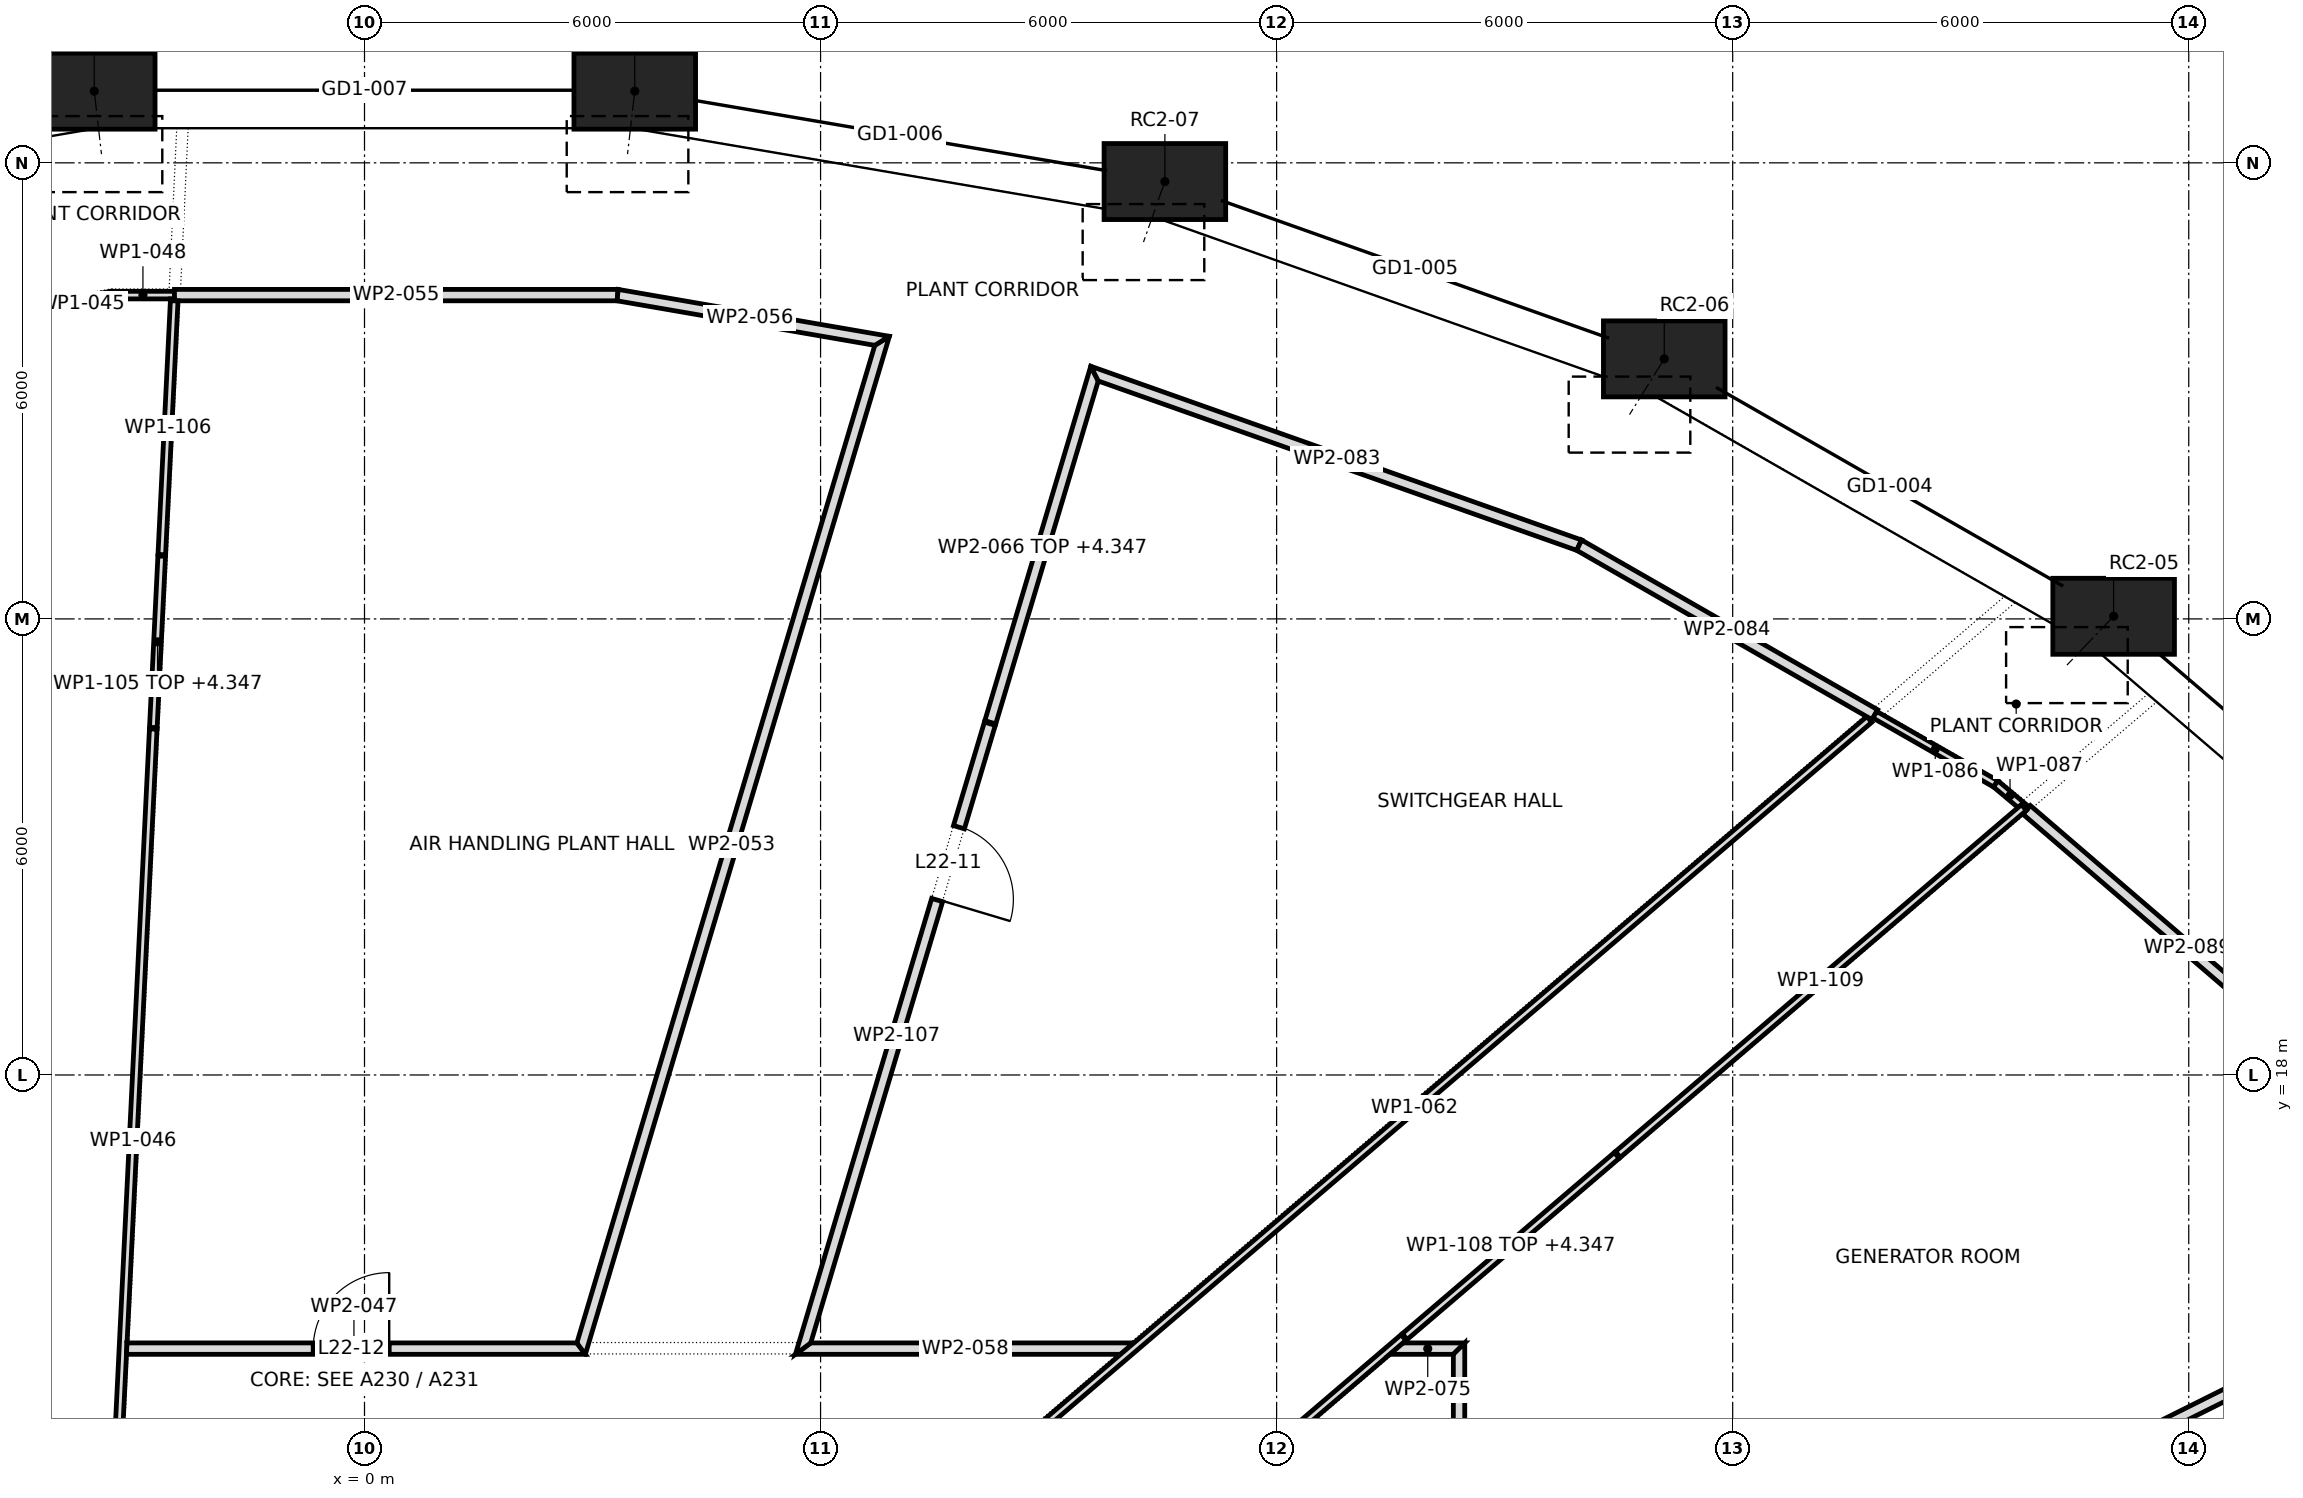
"""IFC4 building model, lengths in metres.
Left out: names, types, materials, properties, quantities, classifications, styles, units other than length and angle.
Written with IfcOpenShell. Run it as: python <this file> out.ifc"""

import sys

from ifc_helpers import new_model, si_unit, direction, frame, frame_2d, origin, origin_2d, place, context, subcontext, project, spatial, polyline, rectangle, outline, extrude, element, fill, save


model = new_model("IFC4")
c1 = context("Model", 3, precision=1e-05, world=origin(), true_north=direction((0.0, 1.0)))
c2 = subcontext(c1, "Body", "Model", "MODEL_VIEW")
j1 = project(units=[si_unit("LENGTHUNIT", "METRE"), si_unit("PLANEANGLEUNIT", "RADIAN")], contexts=[c1])
p1 = place(None, origin())
s1 = spatial("IfcSite", under=j1, at=p1, CompositionType="ELEMENT")
p2 = place(p1, origin())
s2 = spatial("IfcBuilding", under=s1, at=p2, CompositionType="ELEMENT")
p3 = place(p2, frame((0.0, 0.0, 99.1)))
s3 = spatial("IfcBuildingStorey", under=s2, at=p3, CompositionType="ELEMENT", Elevation=99.1)
p4 = place(p3, frame((23.012, 24.034, 0.083), z_axis=(-0.115812481815, -0.12096379157, 0.985877898213), x_axis=(0.722319686129, -0.691559304059, 0.0)))
e1 = element("IfcColumn", 1, at=p4, inside=s3, PredefinedType="COLUMN", context=c2, shape_type="SweptSolid", body=[
    extrude(rectangle(XDim=1.6, YDim=1.0, at=origin_2d()), origin(), (0.0, 0.0, 1.0), 5.308),
])
p5 = place(p3, frame((17.1, 27.421, 0.081), z_axis=(-0.08609317292, -0.138107798226, 0.986668232815), x_axis=(0.848616882571, -0.529007926798, 0.0)))
e2 = element("IfcColumn", 2, at=p5, inside=s3, PredefinedType="COLUMN", context=c2, shape_type="SweptSolid", body=[
    extrude(rectangle(XDim=1.6, YDim=1.0, at=origin_2d()), origin(), (0.0, 0.0, 1.0), 5.309),
])
p6 = place(p3, frame((10.53, 29.754, 0.079), z_axis=(-0.053064720362, -0.149997502446, 0.987261305184), x_axis=(0.942744642547, -0.333515425352, 0.0)))
e3 = element("IfcColumn", 3, at=p6, inside=s3, PredefinedType="COLUMN", context=c2, shape_type="SweptSolid", body=[
    extrude(rectangle(XDim=1.6, YDim=1.0, at=origin_2d()), origin(), (0.0, 0.0, 1.0), 5.309),
])
for number, where, z_axis, x_axis in (
    (4, (3.556, 30.943, 0.078), (-0.018, -0.156, 0.988), (0.993, -0.114, 0.0)),
    (5, (-3.556, 30.943, 0.078), (0.018, -0.156, 0.988), (0.993, 0.114, 0.0)),
):
    element("IfcColumn", number, at=place(p3, frame(where, z_axis=z_axis, x_axis=x_axis)), inside=s3, PredefinedType="COLUMN", context=c2, shape_type="SweptSolid", body=[
        extrude(rectangle(XDim=1.6, YDim=1.0, at=origin_2d()), origin(), (0.0, 0.0, 1.0), 5.31),
    ])
p7 = place(p3, frame((-3.326, 28.261, 0.0), z_axis=(0.0, 0.0, 1.0), x_axis=(-0.985421236807, -0.170132260461, 0.0)))
e6 = element("IfcWall", 6, at=p7, inside=s3, PredefinedType="PARTITIONING", context=c2, shape_type="SweptSolid", body=[
    extrude(outline(polyline([(1.415, 0.05), (0.009, 0.05), (0.0, -0.05), (1.415, -0.05), (1.415, 0.05)])), origin(), (0.0, 0.0, 1.0), 5.1),
])
p8 = place(p3, frame((-3.31, 11.7, 0.0), z_axis=(0.0, 0.0, 1.0), x_axis=(0.048854758108, 0.99880589336, 0.0)))
e7 = element("IfcWall", 7, at=p8, inside=s3, PredefinedType="PARTITIONING", context=c2, shape_type="SweptSolid", body=[
    extrude(outline(polyline([(0.0, -0.05), (1.382, -0.05), (2.765, -0.05), (2.781, -0.049), (2.781, -0.05), (4.399, -0.05), (6.018, -0.05), (7.637, -0.05), (9.255, -0.05), (10.874, -0.05), (10.874, 0.05), (9.062, 0.05), (7.249, 0.05), (5.437, 0.05), (3.625, 0.05), (1.812, 0.05), (0.0, 0.05), (0.0, -0.05)])), origin(), (0.0, 0.0, 1.0), 5.1),
])
p9 = place(p3, frame((-3.132, 14.4, 0.0), z_axis=(0.0, 0.0, 1.0), x_axis=(1.0, 0.0, 0.0)))
e8 = element("IfcWall", 8, at=p9, inside=s3, PredefinedType="PARTITIONING", context=c2, shape_type="SweptSolid", body=[
    extrude(outline(polyline([(0.0, -0.075), (1.509, -0.075), (3.019, -0.075), (4.528, -0.075), (6.038, -0.075), (5.982, 0.0), (5.926, 0.075), (3.953, 0.075), (1.98, 0.075), (0.007, 0.075), (0.0, -0.075)])), origin(), (0.0, 0.0, 1.0), 5.1),
])
p10 = place(p9, frame((2.457, 0.0, 0.0)))
e9 = element("IfcOpeningElement", 9, at=p10, cuts=e8, PredefinedType="OPENING", context=c2, shape_type="SweptSolid", body=[
    extrude(rectangle(XDim=1.0, YDim=2.1, at=frame_2d((0.5, 1.05))), frame((0.0, 0.087, 0.0), z_axis=(0.0, -1.0, 0.0), x_axis=(1.0, 0.0, 0.0)), (0.0, 0.0, 1.0), 0.174),
])
p11 = place(p3, frame((-2.5, 28.26, 0.0), z_axis=(0.0, 0.0, 1.0), x_axis=(-1.0, 0.0, 0.0)))
e10 = element("IfcWall", 10, at=p11, inside=s3, PredefinedType="PARTITIONING", context=c2, shape_type="SweptSolid", body=[
    extrude(outline(polyline([(0.834, -0.05), (0.834, -0.049), (0.826, 0.05), (0.0, 0.05), (0.0, -0.05), (0.834, -0.05)])), origin(), (0.0, 0.0, 1.0), 5.1),
])
p12 = place(p3, frame((2.834, 14.346, 0.0), z_axis=(0.0, 0.0, 1.0), x_axis=(0.286160235994, 0.958181777814, 0.0)))
e11 = element("IfcWall", 11, at=p12, inside=s3, PredefinedType="PARTITIONING", context=c2, shape_type="SweptSolid", body=[
    extrude(outline(polyline([(13.977, -0.075), (13.977, -0.075), (13.809, 0.075), (11.852, 0.075), (9.895, 0.075), (7.938, 0.075), (5.982, 0.075), (4.025, 0.075), (2.068, 0.075), (0.112, 0.075), (0.0, -0.075), (1.997, -0.075), (3.994, -0.075), (5.99, -0.075), (7.987, -0.075), (9.984, -0.075), (11.98, -0.075), (13.977, -0.075)])), origin(), (0.0, 0.0, 1.0), 5.1),
])
p13 = place(p3, frame((3.336, 28.26, 0.0), z_axis=(0.0, 0.0, 1.0), x_axis=(-1.0, 0.0, 0.0)))
e12 = element("IfcWall", 12, at=p13, inside=s3, PredefinedType="PARTITIONING", context=c2, shape_type="SweptSolid", body=[
    extrude(outline(polyline([(5.836, 0.075), (3.895, 0.075), (1.954, 0.075), (0.013, 0.075), (0.0, -0.075), (0.0, -0.075), (1.946, -0.075), (3.891, -0.075), (5.836, -0.075), (5.836, 0.075)])), origin(), (0.0, 0.0, 1.0), 5.1),
])
p14 = place(p3, frame((3.324, 28.261, 0.0), z_axis=(0.0, 0.0, 1.0), x_axis=(0.985386860105, -0.170331253539, 0.0)))
e13 = element("IfcWall", 13, at=p14, inside=s3, PredefinedType="PARTITIONING", context=c2, shape_type="SweptSolid", body=[
    extrude(outline(polyline([(0.013, -0.075), (1.733, -0.075), (3.453, -0.075), (3.622, 0.075), (1.811, 0.075), (0.0, 0.075), (0.0, 0.074), (0.013, -0.075)])), origin(), (0.0, 0.0, 1.0), 5.1),
])
p15 = place(p3, frame((5.669, 14.4, 0.0), z_axis=(0.0, 0.0, 1.0), x_axis=(1.0, 0.0, 0.0)))
e14 = element("IfcWall", 14, at=p15, inside=s3, PredefinedType="PARTITIONING", context=c2, shape_type="SweptSolid", body=[
    extrude(outline(polyline([(0.0, -0.075), (1.426, -0.075), (2.852, -0.075), (4.278, -0.075), (4.453, 0.075), (4.453, 0.075), (3.036, 0.075), (1.618, 0.075), (0.201, 0.075), (0.101, 0.0), (0.0, -0.075)])), origin(), (0.0, 0.0, 1.0), 5.1),
])
p16 = place(p3, frame((7.792, 12.417, 0.0), z_axis=(0.0, 0.0, 1.0), x_axis=(0.76019424358, 0.649695861175, 0.0)))
e15 = element("IfcWall", 15, at=p16, inside=s3, PredefinedType="PARTITIONING", context=c2, shape_type="SweptSolid", body=[
    extrude(outline(polyline([(15.793, 0.05), (13.819, 0.05), (11.845, 0.05), (9.871, 0.05), (7.897, 0.05), (5.922, 0.05), (3.948, 0.05), (1.974, 0.05), (0.0, 0.05), (0.1, -0.05), (2.062, -0.05), (4.023, -0.05), (5.985, -0.05), (7.947, -0.05), (9.908, -0.05), (11.87, -0.05), (13.832, -0.05), (15.793, -0.05), (15.793, 0.05)])), origin(), (0.0, 0.0, 1.0), 5.1),
])
p17 = place(p3, frame((9.627, 27.302, 0.0), z_axis=(0.0, 0.0, 1.0), x_axis=(-0.286438266336, -0.958098700332, 0.0)))
e16 = element("IfcWall", 16, at=p17, inside=s3, PredefinedType="PARTITIONING", context=c2, shape_type="SweptSolid", body=[
    extrude(outline(polyline([(4.876, 0.075), (3.303, 0.075), (1.73, 0.075), (0.158, 0.075), (0.0, -0.075), (1.625, -0.075), (3.251, -0.075), (4.876, -0.075), (4.876, 0.075)])), origin(), (0.0, 0.0, 1.0), 4.347),
])
p18 = place(p3, frame((10.34, 11.7, 0.0), z_axis=(0.0, 0.0, 1.0), x_axis=(0.760272395003, 0.649604406848, 0.0)))
e17 = element("IfcWall", 17, at=p18, inside=s3, PredefinedType="PARTITIONING", context=c2, shape_type="SweptSolid", body=[
    extrude(rectangle(XDim=4.39, YDim=0.1, at=frame_2d((2.195, 0.0))), origin(), (0.0, 0.0, 1.0), 5.1),
])
p19 = place(p3, frame((13.488, 14.4, 0.0), z_axis=(0.0, 0.0, 1.0), x_axis=(1.0, 0.0, 0.0)))
e18 = element("IfcWall", 18, at=p19, inside=s3, PredefinedType="PARTITIONING", context=c2, shape_type="SweptSolid", body=[
    extrude(outline(polyline([(0.001, -0.075), (0.837, -0.075), (0.837, -0.075), (0.987, 0.075), (0.177, 0.075), (0.001, -0.075)])), origin(), (0.0, 0.0, 1.0), 5.1),
])
p20 = place(p3, frame((14.292, 8.706, 0.0), z_axis=(0.0, 0.0, 1.0), x_axis=(0.894694684053, 0.446678208925, 0.0)))
e19 = element("IfcWall", 19, at=p20, inside=s3, PredefinedType="PARTITIONING", context=c2, shape_type="SweptSolid", body=[
    extrude(outline(polyline([(15.324, -0.075), (15.324, -0.075), (15.141, 0.075), (13.279, 0.075), (11.417, 0.075), (9.554, 0.075), (7.692, 0.075), (5.83, 0.075), (3.967, 0.075), (2.105, 0.075), (0.242, 0.075), (0.0, -0.075), (1.916, -0.075), (3.831, -0.075), (5.747, -0.075), (7.662, -0.075), (9.578, -0.075), (11.493, -0.075), (13.409, -0.075), (15.324, -0.075)])), origin(), (0.0, 0.0, 1.0), 5.1),
])
p21 = place(p20, frame((7.177, 0.0, 0.0)))
e20 = element("IfcOpeningElement", 20, at=p21, cuts=e19, PredefinedType="OPENING", context=c2, shape_type="SweptSolid", body=[
    extrude(rectangle(XDim=1.0, YDim=2.1, at=frame_2d((0.5, 1.05))), frame((0.0, 0.087, 0.0), z_axis=(0.0, -1.0, 0.0), x_axis=(1.0, 0.0, 0.0)), (0.0, 0.0, 1.0), 0.174),
])
p22 = place(p3, frame((14.4, 14.475, 0.0), z_axis=(0.0, 0.0, 1.0), x_axis=(0.0, -1.0, 0.0)))
e21 = element("IfcWall", 21, at=p22, inside=s3, PredefinedType="PARTITIONING", context=c2, shape_type="SweptSolid", body=[
    extrude(outline(polyline([(5.836, -0.075), (5.836, -0.075), (5.594, 0.075), (3.729, 0.075), (1.865, 0.075), (0.0, 0.075), (0.15, -0.075), (2.046, -0.075), (3.941, -0.075), (5.836, -0.075)])), origin(), (0.0, 0.0, 1.0), 5.1),
])
p23 = place(p3, frame((15.986, 24.968, 0.0), z_axis=(0.0, 0.0, 1.0), x_axis=(-0.942675356436, 0.333711211032, 0.0)))
e22 = element("IfcWall", 22, at=p23, inside=s3, PredefinedType="PARTITIONING", context=c2, shape_type="SweptSolid", body=[
    extrude(outline(polyline([(6.849, -0.075), (6.849, -0.075), (6.692, 0.075), (5.022, 0.075), (3.353, 0.075), (1.683, 0.075), (0.013, 0.075), (0.0, -0.074), (0.0, -0.075), (1.712, -0.075), (3.425, -0.075), (5.137, -0.075), (6.849, -0.075)])), origin(), (0.0, 0.0, 1.0), 5.1),
])
p24 = place(p3, frame((19.87, 22.74, 0.0), z_axis=(0.0, 0.0, 1.0), x_axis=(-0.867559828307, 0.497332830515, 0.0)))
e23 = element("IfcWall", 23, at=p24, inside=s3, PredefinedType="PARTITIONING", context=c2, shape_type="SweptSolid", body=[
    extrude(outline(polyline([(4.491, -0.075), (4.491, -0.075), (4.477, 0.075), (2.985, 0.075), (1.492, 0.075), (0.0, 0.075), (0.0, -0.075), (1.497, -0.075), (2.994, -0.075), (4.491, -0.075)])), origin(), (0.0, 0.0, 1.0), 5.1),
])
p25 = place(p3, frame((21.464, 21.828, 0.0), z_axis=(0.0, 0.0, 1.0), x_axis=(-0.867915684875, 0.496711550045, 0.0)))
e24 = element("IfcWall", 24, at=p25, inside=s3, PredefinedType="PARTITIONING", context=c2, shape_type="SweptSolid", body=[
    extrude(outline(polyline([(1.836, 0.05), (0.009, 0.05), (0.0, -0.049), (0.0, -0.05), (1.836, -0.05), (1.836, 0.05)])), origin(), (0.0, 0.0, 1.0), 5.1),
])
p26 = place(p3, frame((21.869, 21.488, 0.0), z_axis=(0.0, 0.0, 1.0), x_axis=(-0.766357366052, 0.642414498201, 0.0)))
e25 = element("IfcWall", 25, at=p26, inside=s3, PredefinedType="PARTITIONING", context=c2, shape_type="SweptSolid", body=[
    extrude(outline(polyline([(0.0, -0.05), (0.538, -0.05), (0.533, 0.0), (0.529, 0.05), (0.108, 0.05), (0.098, -0.008), (0.0, 0.008), (0.0, -0.037), (0.0, -0.05)])), origin(), (0.0, 0.0, 1.0), 5.1),
])
p27 = place(p3, frame((26.096, 17.855, 0.0), z_axis=(0.0, 0.0, 1.0), x_axis=(-0.758501684647, 0.651671078373, 0.0)))
e26 = element("IfcWall", 26, at=p27, inside=s3, PredefinedType="PARTITIONING", context=c2, shape_type="SweptSolid", body=[
    extrude(outline(polyline([(5.574, 0.075), (3.721, 0.075), (1.868, 0.075), (0.015, 0.075), (0.0, -0.075), (1.858, -0.075), (3.716, -0.075), (5.574, -0.075), (5.574, 0.075)])), origin(), (0.0, 0.0, 1.0), 5.1),
])
p28 = place(p3, frame((-2.779, 22.561, 0.0), z_axis=(0.0, 0.0, 1.0), x_axis=(0.048884279137, 0.998804448955, 0.0)))
e27 = element("IfcWall", 27, at=p28, inside=s3, PredefinedType="PARTITIONING", context=c2, shape_type="SweptSolid", body=[
    extrude(outline(polyline([(0.0, 0.05), (0.0, -0.05), (2.277, -0.05), (2.277, 0.05), (0.0, 0.05)])), origin(), (0.0, 0.0, 1.0), 4.347),
])
p29 = place(p3, frame((-2.667, 24.836, 0.0), z_axis=(0.0, 0.0, 1.0), x_axis=(0.048822871349, 0.998807452532, 0.0)))
e28 = element("IfcWall", 28, at=p29, inside=s3, PredefinedType="PARTITIONING", context=c2, shape_type="SweptSolid", body=[
    extrude(outline(polyline([(0.0, -0.05), (1.678, -0.05), (3.356, -0.05), (3.354, -0.004), (3.375, -0.003), (3.375, 0.05), (1.688, 0.05), (0.0, 0.05), (0.0, -0.05)])), origin(), (0.0, 0.0, 1.0), 5.1),
])
p30 = place(p3, frame((8.23, 22.631, 0.0), z_axis=(0.0, 0.0, 1.0), x_axis=(-0.286358109642, -0.95812266075, 0.0)))
e29 = element("IfcWall", 29, at=p30, inside=s3, PredefinedType="PARTITIONING", context=c2, shape_type="SweptSolid", body=[
    extrude(outline(polyline([(0.0, -0.075), (1.738, -0.075), (3.476, -0.075), (5.215, -0.075), (6.953, -0.075), (8.691, -0.075), (8.49, 0.075), (6.792, 0.075), (5.094, 0.075), (3.396, 0.075), (1.698, 0.075), (0.0, 0.075), (0.0, -0.075)])), origin(), (0.0, 0.0, 1.0), 5.1),
])
p31 = place(p30, frame((1.421, 0.0, 0.0)))
e30 = element("IfcOpeningElement", 30, at=p31, cuts=e29, PredefinedType="OPENING", context=c2, shape_type="SweptSolid", body=[
    extrude(rectangle(XDim=1.0, YDim=2.1, at=frame_2d((0.5, 1.05))), frame((0.0, 0.087, 0.0), z_axis=(0.0, -1.0, 0.0), x_axis=(1.0, 0.0, 0.0)), (0.0, 0.0, 1.0), 0.174),
])
p32 = place(p3, frame((13.678, 14.552, 0.0), z_axis=(0.0, 0.0, 1.0), x_axis=(0.760241551137, 0.649640503605, 0.0)))
e31 = element("IfcWall", 31, at=p32, inside=s3, PredefinedType="PARTITIONING", context=c2, shape_type="SweptSolid", body=[
    extrude(rectangle(XDim=3.688, YDim=0.1, at=frame_2d((1.844, 0.0))), origin(), (0.0, 0.0, 1.0), 4.347),
])
p33 = place(p3, frame((16.482, 16.948, 0.0), z_axis=(0.0, 0.0, 1.0), x_axis=(0.760281921653, 0.649593257052, 0.0)))
e32 = element("IfcWall", 32, at=p33, inside=s3, PredefinedType="PARTITIONING", context=c2, shape_type="SweptSolid", body=[
    extrude(rectangle(XDim=7.036, YDim=0.1, at=frame_2d((3.518, 0.0))), origin(), (0.0, 0.0, 1.0), 5.1),
])
p34 = place(p31, origin())
e33 = element("IfcDoor", 33, at=p34, inside=s3, OperationType="SINGLE_SWING_LEFT", PredefinedType="DOOR", context=c2, shape_type="SweptSolid", body=[
    extrude(rectangle(XDim=1.0, YDim=2.1, at=frame_2d((0.5, 1.05))), frame((0.0, 0.025, 0.0), z_axis=(0.0, -1.0, 0.0), x_axis=(1.0, 0.0, 0.0)), (0.0, 0.0, 1.0), 0.05),
])
fill(e30, e33)
p35 = place(p10, origin())
e34 = element("IfcDoor", 34, at=p35, inside=s3, OperationType="SINGLE_SWING_LEFT", PredefinedType="DOOR", context=c2, shape_type="SweptSolid", body=[
    extrude(rectangle(XDim=1.0, YDim=2.1, at=frame_2d((0.5, 1.05))), frame((0.0, 0.025, 0.0), z_axis=(0.0, -1.0, 0.0), x_axis=(1.0, 0.0, 0.0)), (0.0, 0.0, 1.0), 0.05),
])
fill(e9, e34)
save(model, sys.argv[1])
